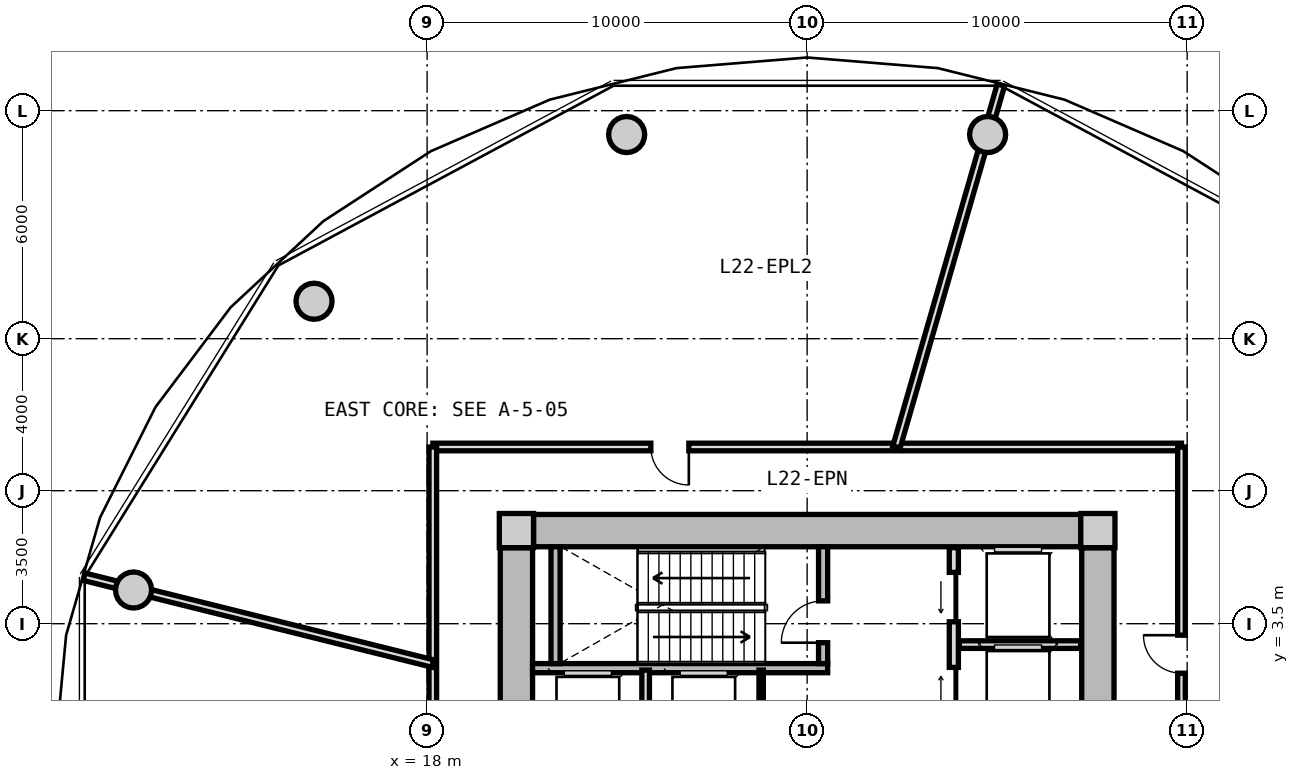
"""IFC4 building model, lengths in metres.
Left out: names, types, materials, properties, quantities, classifications, styles, units other than length and angle.
Written with IfcOpenShell. Run it as: python <this file> out.ifc"""

import sys

from ifc_helpers import new_model, si_unit, direction, frame, frame_2d, origin, origin_2d, place, context, subcontext, project, spatial, rectangle, circle, extrude, source, transform, mapped, element, fill, save


model = new_model("IFC4")
c1 = context("Model", 3, precision=1e-05, world=origin(), true_north=direction((0.0, 1.0)))
c2 = subcontext(c1, "Body", "Model", "MODEL_VIEW")
j1 = project(units=[si_unit("LENGTHUNIT", "METRE"), si_unit("PLANEANGLEUNIT", "RADIAN")], contexts=[c1])
p1 = place(None, origin())
s1 = spatial("IfcSite", under=j1, at=p1, CompositionType="ELEMENT")
p2 = place(p1, origin())
s2 = spatial("IfcBuilding", under=s1, at=p2, CompositionType="ELEMENT")
p3 = place(p2, frame((0.0, 0.0, 73.45)))
s3 = spatial("IfcBuildingStorey", under=s2, at=p3, CompositionType="ELEMENT", Elevation=73.45)
m1 = source(origin(), c2, "Body", "SweptSolid", [
    extrude(rectangle(XDim=0.9, YDim=0.9, at=origin_2d()), origin(), (0.0, 0.0, 1.0), 4.5),
])
for number, where, z_axis, x_axis in (
    (1, (35.65, 5.95, 0.0), (0.0, 0.0, 1.0), (1.0, 0.0, 0.0)),
    (2, (20.35, 5.95, 0.0), (0.0, 0.0, 1.0), (1.0, 0.0, 0.0)),
):
    element("IfcColumn", number, at=place(p3, frame(where, z_axis=z_axis, x_axis=x_axis)), inside=s3, PredefinedType="COLUMN", context=c2, shape_type="MappedRepresentation", body=[
        mapped(m1, transform((0.0, 0.0, 0.0), x_axis=(1.0, 0.0, 0.0), y_axis=(0.0, 1.0, 0.0), z_axis=(0.0, 0.0, 1.0), scale=1.0)),
    ])
m2 = source(origin(), c2, "Body", "SweptSolid", [
    extrude(rectangle(XDim=14.4, YDim=0.85, at=frame_2d((7.2, 0.0))), origin(), (0.0, 0.0, 1.0), 4.08),
])
p4 = place(p3, frame((20.8, 5.95, 0.0), z_axis=(0.0, 0.0, 1.0), x_axis=(1.0, 0.0, 0.0)))
e3 = element("IfcWall", 3, at=p4, inside=s3, PredefinedType="SHEAR", context=c2, shape_type="MappedRepresentation", body=[
    mapped(m2, transform((0.0, 0.0, 0.0), x_axis=(1.0, 0.0, 0.0), y_axis=(0.0, 1.0, 0.0), z_axis=(0.0, 0.0, 1.0), scale=1.0)),
])
m3 = source(origin(), c2, "Body", "SweptSolid", [
    extrude(rectangle(XDim=11.0, YDim=0.85, at=frame_2d((5.5, 0.0))), origin(), (0.0, 0.0, 1.0), 4.08),
])
p5 = place(p3, frame((20.35, -5.5, 0.0), z_axis=(0.0, 0.0, 1.0), x_axis=(0.0, 1.0, 0.0)))
e4 = element("IfcWall", 4, at=p5, inside=s3, PredefinedType="SHEAR", context=c2, shape_type="MappedRepresentation", body=[
    mapped(m3, transform((0.0, 0.0, 0.0), x_axis=(1.0, 0.0, 0.0), y_axis=(0.0, 1.0, 0.0), z_axis=(0.0, 0.0, 1.0), scale=1.0)),
])
p6 = place(p5, frame((3.8, 0.0, 0.0)))
e5 = element("IfcOpeningElement", 5, at=p6, cuts=e4, PredefinedType="OPENING", context=c2, shape_type="SweptSolid", body=[
    extrude(rectangle(XDim=1.2, YDim=2.15, at=frame_2d((0.6, 1.075))), frame((0.0, 0.435, 0.0), z_axis=(0.0, -1.0, 0.0), x_axis=(1.0, 0.0, 0.0)), (0.0, 0.0, 1.0), 0.87),
])
p7 = place(p3, frame((35.65, 5.5, 0.0), z_axis=(0.0, 0.0, 1.0), x_axis=(0.0, -1.0, 0.0)))
e6 = element("IfcWall", 6, at=p7, inside=s3, PredefinedType="SHEAR", context=c2, shape_type="MappedRepresentation", body=[
    mapped(m3, transform((0.0, 0.0, 0.0), x_axis=(1.0, 0.0, 0.0), y_axis=(0.0, 1.0, 0.0), z_axis=(0.0, 0.0, 1.0), scale=1.0)),
])
p8 = place(p7, frame((5.65, 0.0, 0.0)))
e7 = element("IfcOpeningElement", 7, at=p8, cuts=e6, PredefinedType="OPENING", context=c2, shape_type="SweptSolid", body=[
    extrude(rectangle(XDim=1.2, YDim=2.15, at=frame_2d((0.6, 1.075))), frame((0.0, 0.435, 0.0), z_axis=(0.0, -1.0, 0.0), x_axis=(1.0, 0.0, 0.0)), (0.0, 0.0, 1.0), 0.87),
])
p9 = place(p7, frame((9.3, 0.0, 0.0)))
e8 = element("IfcOpeningElement", 8, at=p9, cuts=e6, PredefinedType="OPENING", context=c2, shape_type="SweptSolid", body=[
    extrude(rectangle(XDim=1.0, YDim=2.1, at=frame_2d((0.5, 1.05))), frame((0.0, 0.435, 0.0), z_axis=(0.0, -1.0, 0.0), x_axis=(1.0, 0.0, 0.0)), (0.0, 0.0, 1.0), 0.87),
])
m4 = source(origin(), c2, "Body", "SweptSolid", [
    extrude(circle(Radius=0.475, at=origin_2d()), origin(), (0.0, 0.0, 1.0), 4.08),
])
for number, where, z_axis, x_axis in (
    (9, (32.749, 16.373, 0.0), (0.0, 0.0, 1.0), (1.0, 0.0, 0.0)),
    (10, (23.251, 16.373, 0.0), (0.0, 0.0, 1.0), (1.0, 0.0, 0.0)),
    (11, (15.025, 11.985, 0.0), (0.0, 0.0, 1.0), (1.0, 0.0, 0.0)),
    (12, (10.275, 4.387, 0.0), (0.0, 0.0, 1.0), (1.0, 0.0, 0.0)),
):
    element("IfcColumn", number, at=place(p3, frame(where, z_axis=z_axis, x_axis=x_axis)), inside=s3, PredefinedType="COLUMN", context=c2, shape_type="MappedRepresentation", body=[
        mapped(m4, transform((0.0, 0.0, 0.0), x_axis=(1.0, 0.0, 0.0), y_axis=(0.0, 1.0, 0.0), z_axis=(0.0, 0.0, 1.0), scale=1.0)),
    ])
m5 = source(origin(), c2, "Body", "SweptSolid", [
    extrude(rectangle(XDim=7.765, YDim=0.24, at=frame_2d((3.883, 0.0))), origin(), (0.0, 0.0, 1.0), 4.08),
])
p10 = place(p3, frame((20.775, 2.33, 0.0), z_axis=(0.0, 0.0, 1.0), x_axis=(1.0, 0.0, 0.0)))
e13 = element("IfcWall", 13, at=p10, inside=s3, PredefinedType="PARTITIONING", context=c2, shape_type="MappedRepresentation", body=[
    mapped(m5, transform((0.0, 0.0, 0.0), x_axis=(1.0, 0.0, 0.0), y_axis=(0.0, 1.0, 0.0), z_axis=(0.0, 0.0, 1.0), scale=1.0)),
])
m6 = source(origin(), c2, "Body", "SweptSolid", [
    extrude(rectangle(XDim=3.075, YDim=0.24, at=frame_2d((1.538, 0.0))), origin(), (0.0, 0.0, 1.0), 4.08),
])
p11 = place(p3, frame((21.38, 2.45, 0.0), z_axis=(0.0, 0.0, 1.0), x_axis=(0.0, 1.0, 0.0)))
e14 = element("IfcWall", 14, at=p11, inside=s3, PredefinedType="PARTITIONING", context=c2, shape_type="MappedRepresentation", body=[
    mapped(m6, transform((0.0, 0.0, 0.0), x_axis=(1.0, 0.0, 0.0), y_axis=(0.0, 1.0, 0.0), z_axis=(0.0, 0.0, 1.0), scale=1.0)),
])
p12 = place(p3, frame((28.42, 2.45, 0.0), z_axis=(0.0, 0.0, 1.0), x_axis=(0.0, 1.0, 0.0)))
e15 = element("IfcWall", 15, at=p12, inside=s3, PredefinedType="PARTITIONING", context=c2, shape_type="MappedRepresentation", body=[
    mapped(m6, transform((0.0, 0.0, 0.0), x_axis=(1.0, 0.0, 0.0), y_axis=(0.0, 1.0, 0.0), z_axis=(0.0, 0.0, 1.0), scale=1.0)),
])
p13 = place(p12, frame((0.55, 0.0, 0.0)))
e16 = element("IfcOpeningElement", 16, at=p13, cuts=e15, PredefinedType="OPENING", context=c2, shape_type="SweptSolid", body=[
    extrude(rectangle(XDim=1.1, YDim=2.15, at=frame_2d((0.55, 1.075))), frame((0.0, 0.13, 0.0), z_axis=(0.0, -1.0, 0.0), x_axis=(1.0, 0.0, 0.0)), (0.0, 0.0, 1.0), 0.26),
])
m7 = source(origin(), c2, "Body", "SweptSolid", [
    extrude(rectangle(XDim=5.0, YDim=0.24, at=frame_2d((2.5, 0.0))), origin(), (0.0, 0.0, 1.0), 4.065),
])
p14 = place(p3, frame((31.86, 0.5, 0.0), z_axis=(0.0, 0.0, 1.0), x_axis=(0.0, 1.0, 0.0)))
e17 = element("IfcWall", 17, at=p14, inside=s3, PredefinedType="PARTITIONING", context=c2, shape_type="MappedRepresentation", body=[
    mapped(m7, transform((0.0, 0.0, 0.0), x_axis=(1.0, 0.0, 0.0), y_axis=(0.0, 1.0, 0.0), z_axis=(0.0, 0.0, 1.0), scale=1.0)),
])
p15 = place(p14, frame((3.05, 0.0, 0.0)))
e18 = element("IfcOpeningElement", 18, at=p15, cuts=e17, PredefinedType="OPENING", context=c2, shape_type="SweptSolid", body=[
    extrude(rectangle(XDim=1.3, YDim=2.2, at=frame_2d((0.65, 1.1))), frame((0.0, 0.13, 0.0), z_axis=(0.0, -1.0, 0.0), x_axis=(1.0, 0.0, 0.0)), (0.0, 0.0, 1.0), 0.26),
])
p16 = place(p14, frame((0.55, 0.0, 0.0)))
e19 = element("IfcOpeningElement", 19, at=p16, cuts=e17, PredefinedType="OPENING", context=c2, shape_type="SweptSolid", body=[
    extrude(rectangle(XDim=1.3, YDim=2.2, at=frame_2d((0.65, 1.1))), frame((0.0, 0.13, 0.0), z_axis=(0.0, -1.0, 0.0), x_axis=(1.0, 0.0, 0.0)), (0.0, 0.0, 1.0), 0.26),
])
m8 = source(origin(), c2, "Body", "SweptSolid", [
    extrude(rectangle(XDim=3.2, YDim=0.2, at=frame_2d((1.6, 0.0))), origin(), (0.0, 0.0, 1.0), 4.065),
])
p17 = place(p3, frame((32.0, 2.95, 0.0), z_axis=(0.0, 0.0, 1.0), x_axis=(1.0, 0.0, 0.0)))
e20 = element("IfcWall", 20, at=p17, inside=s3, PredefinedType="PARTITIONING", context=c2, shape_type="MappedRepresentation", body=[
    mapped(m8, transform((0.0, 0.0, 0.0), x_axis=(1.0, 0.0, 0.0), y_axis=(0.0, 1.0, 0.0), z_axis=(0.0, 0.0, 1.0), scale=1.0)),
])
m9 = source(origin(), c2, "Body", "SweptSolid", [
    extrude(rectangle(XDim=2.33, YDim=0.115, at=frame_2d((1.165, 0.0))), origin(), (0.0, 0.0, 1.0), 4.065),
])
p18 = place(p3, frame((26.79, -0.05, 0.0), z_axis=(0.0, 0.0, 1.0), x_axis=(0.0, 1.0, 0.0)))
e21 = element("IfcWall", 21, at=p18, inside=s3, PredefinedType="PARTITIONING", context=c2, shape_type="MappedRepresentation", body=[
    mapped(m9, transform((0.0, 0.0, 0.0), x_axis=(1.0, 0.0, 0.0), y_axis=(0.0, 1.0, 0.0), z_axis=(0.0, 0.0, 1.0), scale=1.0)),
])
m10 = source(origin(), c2, "Body", "SweptSolid", [
    extrude(rectangle(XDim=2.33, YDim=0.2, at=frame_2d((1.165, 0.0))), origin(), (0.0, 0.0, 1.0), 4.065),
])
p19 = place(p3, frame((23.75, -0.05, 0.0), z_axis=(0.0, 0.0, 1.0), x_axis=(0.0, 1.0, 0.0)))
e22 = element("IfcWall", 22, at=p19, inside=s3, PredefinedType="PARTITIONING", context=c2, shape_type="MappedRepresentation", body=[
    mapped(m10, transform((0.0, 0.0, 0.0), x_axis=(1.0, 0.0, 0.0), y_axis=(0.0, 1.0, 0.0), z_axis=(0.0, 0.0, 1.0), scale=1.0)),
])
m11 = source(origin(), c2, "Body", "SweptSolid", [
    extrude(rectangle(XDim=19.7, YDim=0.2, at=frame_2d((9.85, 0.0))), origin(), (0.0, 0.0, 1.0), 4.065),
])
p20 = place(p3, frame((18.15, 8.15, 0.0), z_axis=(0.0, 0.0, 1.0), x_axis=(1.0, 0.0, 0.0)))
e23 = element("IfcWall", 23, at=p20, inside=s3, PredefinedType="PARTITIONING", context=c2, shape_type="MappedRepresentation", body=[
    mapped(m11, transform((0.0, 0.0, 0.0), x_axis=(1.0, 0.0, 0.0), y_axis=(0.0, 1.0, 0.0), z_axis=(0.0, 0.0, 1.0), scale=1.0)),
])
p21 = place(p20, frame((5.737, 0.0, 0.0)))
e24 = element("IfcOpeningElement", 24, at=p21, cuts=e23, PredefinedType="OPENING", context=c2, shape_type="SweptSolid", body=[
    extrude(rectangle(XDim=1.0, YDim=2.1, at=frame_2d((0.5, 1.05))), frame((0.0, 0.11, 0.0), z_axis=(0.0, -1.0, 0.0), x_axis=(1.0, 0.0, 0.0)), (0.0, 0.0, 1.0), 0.22),
])
m12 = source(origin(), c2, "Body", "SweptSolid", [
    extrude(rectangle(XDim=16.3, YDim=0.2, at=frame_2d((8.15, 0.0))), origin(), (0.0, 0.0, 1.0), 4.065),
])
p22 = place(p3, frame((18.15, -8.15, 0.0), z_axis=(0.0, 0.0, 1.0), x_axis=(0.0, 1.0, 0.0)))
e25 = element("IfcWall", 25, at=p22, inside=s3, PredefinedType="PARTITIONING", context=c2, shape_type="MappedRepresentation", body=[
    mapped(m12, transform((0.0, 0.0, 0.0), x_axis=(1.0, 0.0, 0.0), y_axis=(0.0, 1.0, 0.0), z_axis=(0.0, 0.0, 1.0), scale=1.0)),
])
p23 = place(p22, frame((4.953, 0.0, 0.0)))
e26 = element("IfcOpeningElement", 26, at=p23, cuts=e25, PredefinedType="OPENING", context=c2, shape_type="SweptSolid", body=[
    extrude(rectangle(XDim=1.0, YDim=2.1, at=frame_2d((0.5, 1.05))), frame((0.0, 0.11, 0.0), z_axis=(0.0, -1.0, 0.0), x_axis=(1.0, 0.0, 0.0)), (0.0, 0.0, 1.0), 0.22),
])
p24 = place(p3, frame((37.85, 8.15, 0.0), z_axis=(0.0, 0.0, 1.0), x_axis=(0.0, -1.0, 0.0)))
e27 = element("IfcWall", 27, at=p24, inside=s3, PredefinedType="PARTITIONING", context=c2, shape_type="MappedRepresentation", body=[
    mapped(m12, transform((0.0, 0.0, 0.0), x_axis=(1.0, 0.0, 0.0), y_axis=(0.0, 1.0, 0.0), z_axis=(0.0, 0.0, 1.0), scale=1.0)),
])
p25 = place(p24, frame((4.953, 0.0, 0.0)))
e28 = element("IfcOpeningElement", 28, at=p25, cuts=e27, PredefinedType="OPENING", context=c2, shape_type="SweptSolid", body=[
    extrude(rectangle(XDim=1.0, YDim=2.1, at=frame_2d((0.5, 1.05))), frame((0.0, 0.11, 0.0), z_axis=(0.0, -1.0, 0.0), x_axis=(1.0, 0.0, 0.0)), (0.0, 0.0, 1.0), 0.22),
])
m13 = source(origin(), c2, "Body", "SweptSolid", [
    extrude(rectangle(XDim=9.915, YDim=0.2, at=frame_2d((4.958, 0.0))), origin(), (0.0, 0.0, 1.0), 4.065),
])
p26 = place(p3, frame((30.351, 8.15, 0.0), z_axis=(0.0, 0.0, 1.0), x_axis=(0.277136607861, 0.960830526463, 0.0)))
e29 = element("IfcWall", 29, at=p26, inside=s3, PredefinedType="PARTITIONING", context=c2, shape_type="MappedRepresentation", body=[
    mapped(m13, transform((0.0, 0.0, 0.0), x_axis=(1.0, 0.0, 0.0), y_axis=(0.0, 1.0, 0.0), z_axis=(0.0, 0.0, 1.0), scale=1.0)),
])
m14 = source(origin(), c2, "Body", "SweptSolid", [
    extrude(rectangle(XDim=9.459, YDim=0.2, at=frame_2d((4.729, 0.0))), origin(), (0.0, 0.0, 1.0), 2.515),
])
p27 = place(p3, frame((18.15, 2.452, 0.0), z_axis=(0.0, 0.0, 1.0), x_axis=(-0.970390989268, 0.241539495626, 0.0)))
e30 = element("IfcWall", 30, at=p27, inside=s3, PredefinedType="PARTITIONING", context=c2, shape_type="MappedRepresentation", body=[
    mapped(m14, transform((0.0, 0.0, 0.0), x_axis=(1.0, 0.0, 0.0), y_axis=(0.0, 1.0, 0.0), z_axis=(0.0, 0.0, 1.0), scale=1.0)),
])
m15 = source(origin(), c2, "Body", "SweptSolid", [
    extrude(rectangle(XDim=1.1, YDim=2.15, at=frame_2d((0.55, 1.075))), frame((0.0, 0.025, 0.0), z_axis=(0.0, -1.0, 0.0), x_axis=(1.0, 0.0, 0.0)), (0.0, 0.0, 1.0), 0.05),
])
p28 = place(p13, origin())
e31 = element("IfcDoor", 31, at=p28, inside=s3, OperationType="SINGLE_SWING_LEFT", PredefinedType="DOOR", context=c2, shape_type="MappedRepresentation", body=[
    mapped(m15, transform((0.0, 0.0, 0.0), x_axis=(1.0, 0.0, 0.0), y_axis=(0.0, 1.0, 0.0), z_axis=(0.0, 0.0, 1.0), scale=1.0)),
])
fill(e16, e31)
m16 = source(origin(), c2, "Body", "SweptSolid", [
    extrude(rectangle(XDim=1.3, YDim=2.2, at=frame_2d((0.65, 1.1))), frame((0.0, 0.025, 0.0), z_axis=(0.0, -1.0, 0.0), x_axis=(1.0, 0.0, 0.0)), (0.0, 0.0, 1.0), 0.05),
])
p29 = place(p15, origin())
e32 = element("IfcDoor", 32, at=p29, inside=s3, OperationType="SLIDING_TO_LEFT", PredefinedType="DOOR", context=c2, shape_type="MappedRepresentation", body=[
    mapped(m16, transform((0.0, 0.0, 0.0), x_axis=(1.0, 0.0, 0.0), y_axis=(0.0, 1.0, 0.0), z_axis=(0.0, 0.0, 1.0), scale=1.0)),
])
fill(e18, e32)
p30 = place(p16, origin())
e33 = element("IfcDoor", 33, at=p30, inside=s3, OperationType="SLIDING_TO_RIGHT", PredefinedType="DOOR", context=c2, shape_type="MappedRepresentation", body=[
    mapped(m16, transform((0.0, 0.0, 0.0), x_axis=(1.0, 0.0, 0.0), y_axis=(0.0, 1.0, 0.0), z_axis=(0.0, 0.0, 1.0), scale=1.0)),
])
fill(e19, e33)
m17 = source(origin(), c2, "Body", "SweptSolid", [
    extrude(rectangle(XDim=1.0, YDim=2.1, at=frame_2d((0.5, 1.05))), frame((0.0, 0.025, 0.0), z_axis=(0.0, -1.0, 0.0), x_axis=(1.0, 0.0, 0.0)), (0.0, 0.0, 1.0), 0.05),
])
p31 = place(p25, frame((1.0, 0.0, 0.0), z_axis=(0.0, 0.0, 1.0), x_axis=(-1.0, 0.0, 0.0)))
e34 = element("IfcDoor", 34, at=p31, inside=s3, OperationType="SINGLE_SWING_RIGHT", PredefinedType="DOOR", context=c2, shape_type="MappedRepresentation", body=[
    mapped(m17, transform((0.0, 0.0, 0.0), x_axis=(1.0, 0.0, 0.0), y_axis=(0.0, 1.0, 0.0), z_axis=(0.0, 0.0, 1.0), scale=1.0)),
])
fill(e28, e34)
p32 = place(p21, frame((1.0, 0.0, 0.0), z_axis=(0.0, 0.0, 1.0), x_axis=(-1.0, 0.0, 0.0)))
e35 = element("IfcDoor", 35, at=p32, inside=s3, OperationType="SINGLE_SWING_LEFT", PredefinedType="DOOR", context=c2, shape_type="MappedRepresentation", body=[
    mapped(m17, transform((0.0, 0.0, 0.0), x_axis=(1.0, 0.0, 0.0), y_axis=(0.0, 1.0, 0.0), z_axis=(0.0, 0.0, 1.0), scale=1.0)),
])
fill(e24, e35)
save(model, sys.argv[1])
